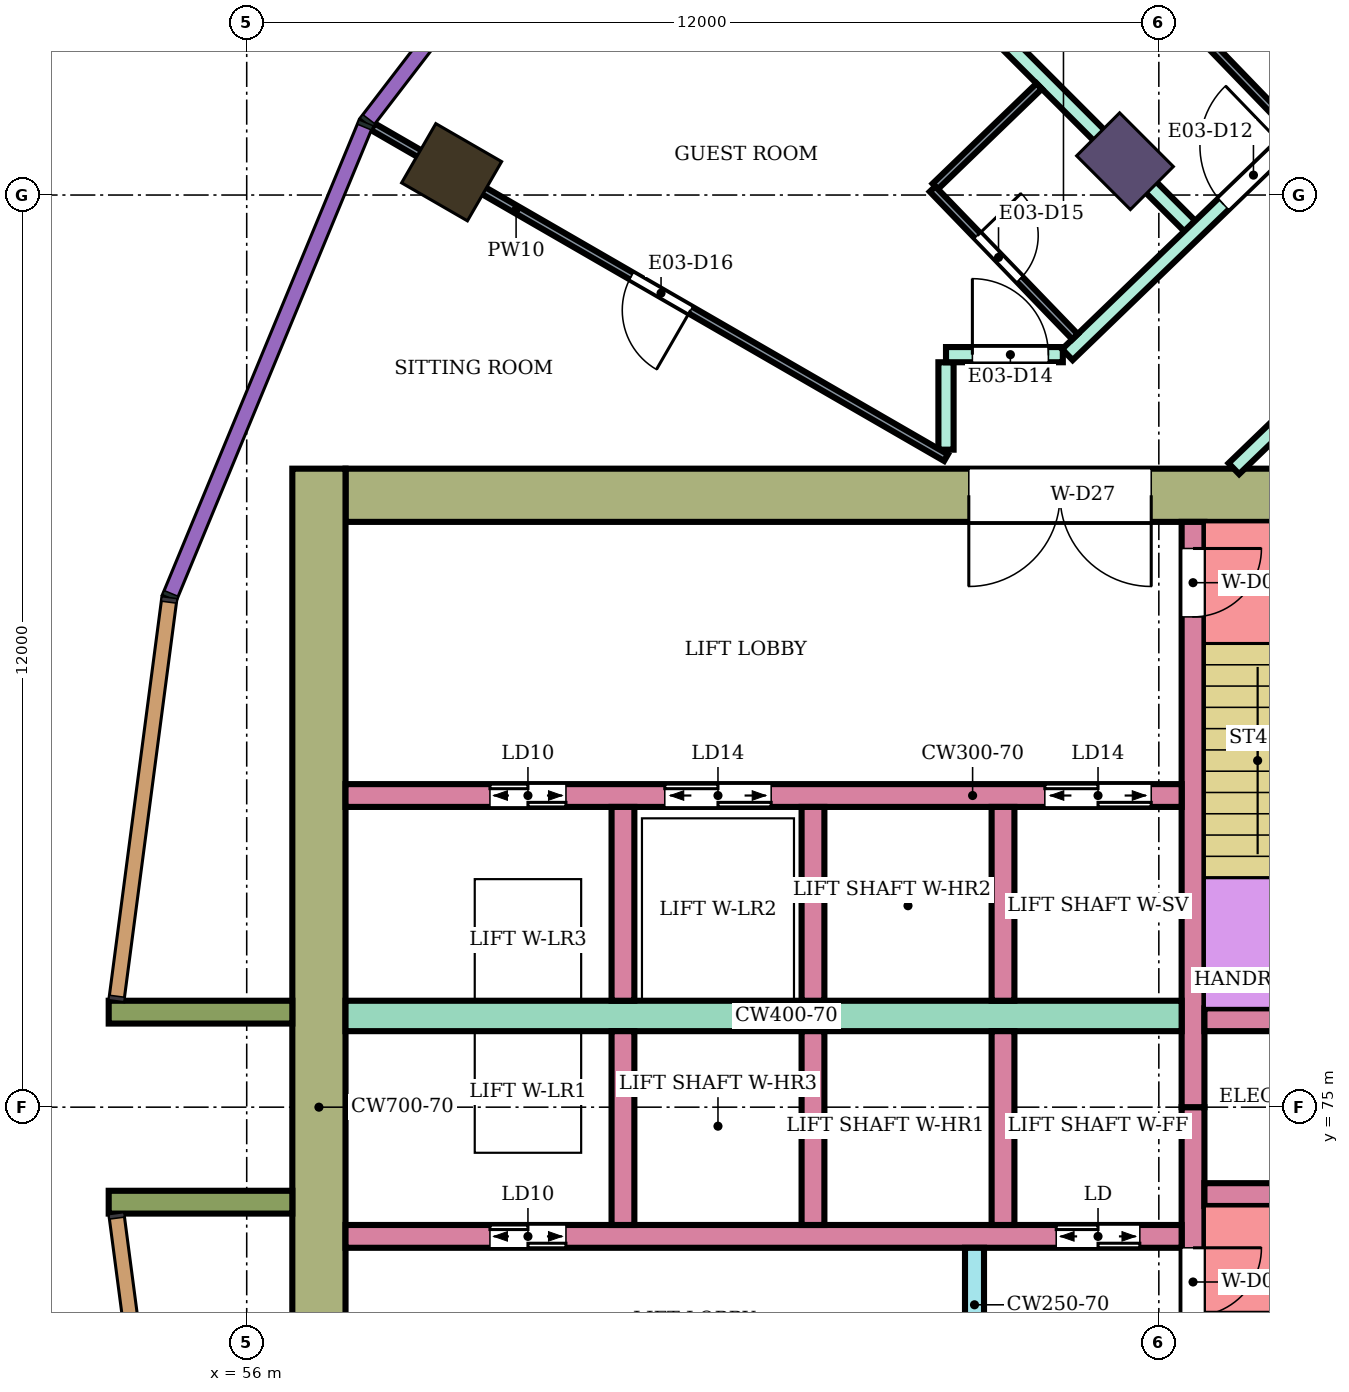
"""IFC4 building model, lengths in metres.
Left out: names, types, materials, properties, quantities, classifications, styles, units other than length and angle.
Written with IfcOpenShell. Run it as: python <this file> out.ifc"""

import sys

from ifc_helpers import new_model, si_unit, direction, frame, frame_2d, origin, origin_2d, place, context, subcontext, project, spatial, rectangle, extrude, element, fill, save


model = new_model("IFC4")
c1 = context("Model", 3, precision=1e-05, world=origin(), true_north=direction((0.0, 1.0)))
c2 = subcontext(c1, "Body", "Model", "MODEL_VIEW")
j1 = project(units=[si_unit("LENGTHUNIT", "METRE"), si_unit("PLANEANGLEUNIT", "RADIAN")], contexts=[c1])
p1 = place(None, origin())
s1 = spatial("IfcSite", under=j1, at=p1, CompositionType="ELEMENT")
p2 = place(p1, origin())
s2 = spatial("IfcBuilding", under=s1, at=p2, CompositionType="ELEMENT")
p3 = place(p2, frame((0.0, 0.0, 138.0)))
s3 = spatial("IfcBuildingStorey", under=s2, at=p3, CompositionType="ELEMENT", Elevation=138.0)
p4 = place(p3, frame((58.696, 87.3, 0.0), z_axis=(0.0, 0.0, 1.0), x_axis=(-0.866025403784, 0.5, 0.0)))
e1 = element("IfcColumn", 1, at=p4, inside=s3, PredefinedType="COLUMN", context=c2, shape_type="SweptSolid", body=[
    extrude(rectangle(XDim=1.0, YDim=0.9, at=origin_2d()), origin(), (0.0, 0.0, 1.0), 3.9),
])
p5 = place(p3, frame((67.555, 87.445, 0.0), z_axis=(0.0, 0.0, 1.0), x_axis=(-0.707106781187, 0.707106781187, 0.0)))
e2 = element("IfcColumn", 2, at=p5, inside=s3, PredefinedType="COLUMN", context=c2, shape_type="SweptSolid", body=[
    extrude(rectangle(XDim=1.0, YDim=0.8, at=origin_2d()), origin(), (0.0, 0.0, 1.0), 3.9),
])
p6 = place(p3, frame((72.1, 83.05, 0.0), z_axis=(0.0, 0.0, 1.0), x_axis=(-1.0, 0.0, 0.0)))
e3 = element("IfcWall", 3, at=p6, inside=s3, PredefinedType="SHEAR", context=c2, shape_type="SweptSolid", body=[
    extrude(rectangle(XDim=14.8, YDim=0.7, at=frame_2d((7.4, 0.0))), origin(), (0.0, 0.0, 1.0), 3.58),
])
p7 = place(p6, frame((4.2, 0.0, 0.0)))
e4 = element("IfcOpeningElement", 4, at=p7, cuts=e3, PredefinedType="OPENING", context=c2, shape_type="SweptSolid", body=[
    extrude(rectangle(XDim=2.4, YDim=2.4, at=frame_2d((1.2, 1.2))), frame((0.0, 0.36, 0.0), z_axis=(0.0, -1.0, 0.0), x_axis=(1.0, 0.0, 0.0)), (0.0, 0.0, 1.0), 0.72),
])
p8 = place(p3, frame((56.95, 83.4, 0.0), z_axis=(0.0, 0.0, 1.0), x_axis=(0.0, -1.0, 0.0)))
e5 = element("IfcWall", 5, at=p8, inside=s3, PredefinedType="SHEAR", context=c2, shape_type="SweptSolid", body=[
    extrude(rectangle(XDim=16.8, YDim=0.7, at=frame_2d((8.4, 0.0))), origin(), (0.0, 0.0, 1.0), 3.58),
])
p9 = place(p3, frame((68.45, 75.0, 0.0), z_axis=(0.0, 0.0, 1.0), x_axis=(0.0, -1.0, 0.0)))
e6 = element("IfcWall", 6, at=p9, inside=s3, PredefinedType="SHEAR", context=c2, shape_type="SweptSolid", body=[
    extrude(rectangle(XDim=7.7, YDim=0.3, at=frame_2d((3.85, 0.0))), origin(), (0.0, 0.0, 1.0), 3.58),
])
p10 = place(p9, frame((1.85, 0.0, 0.0)))
e7 = element("IfcOpeningElement", 7, at=p10, cuts=e6, PredefinedType="OPENING", context=c2, shape_type="SweptSolid", body=[
    extrude(rectangle(XDim=0.9, YDim=2.1, at=frame_2d((0.45, 1.05))), frame((0.0, 0.16, 0.0), z_axis=(0.0, -1.0, 0.0), x_axis=(1.0, 0.0, 0.0)), (0.0, 0.0, 1.0), 0.32),
])
p11 = place(p3, frame((68.45, 82.7, 0.0), z_axis=(0.0, 0.0, 1.0), x_axis=(0.0, -1.0, 0.0)))
e8 = element("IfcWall", 8, at=p11, inside=s3, PredefinedType="SHEAR", context=c2, shape_type="SweptSolid", body=[
    extrude(rectangle(XDim=7.7, YDim=0.3, at=frame_2d((3.85, 0.0))), origin(), (0.0, 0.0, 1.0), 3.58),
])
p12 = place(p11, frame((0.35, 0.0, 0.0)))
e9 = element("IfcOpeningElement", 9, at=p12, cuts=e8, PredefinedType="OPENING", context=c2, shape_type="SweptSolid", body=[
    extrude(rectangle(XDim=0.9, YDim=2.1, at=frame_2d((0.45, 1.05))), frame((0.0, 0.16, 0.0), z_axis=(0.0, -1.0, 0.0), x_axis=(1.0, 0.0, 0.0)), (0.0, 0.0, 1.0), 0.32),
])
p13 = place(p3, frame((71.65, 73.85, 0.0), z_axis=(0.0, 0.0, 1.0), x_axis=(-1.0, 0.0, 0.0)))
e10 = element("IfcWall", 10, at=p13, inside=s3, PredefinedType="SHEAR", context=c2, shape_type="SweptSolid", body=[
    extrude(rectangle(XDim=3.05, YDim=0.3, at=frame_2d((1.525, 0.0))), origin(), (0.0, 0.0, 1.0), 3.58),
])
p14 = place(p13, frame((1.1, 0.0, 0.0)))
e11 = element("IfcOpeningElement", 11, at=p14, cuts=e10, PredefinedType="OPENING", context=c2, shape_type="SweptSolid", body=[
    extrude(rectangle(XDim=0.7, YDim=2.0, at=frame_2d((0.35, 1.0))), frame((0.0, 0.16, 0.0), z_axis=(0.0, -1.0, 0.0), x_axis=(1.0, 0.0, 0.0)), (0.0, 0.0, 1.0), 0.32),
])
p15 = place(p3, frame((71.65, 76.15, 0.0), z_axis=(0.0, 0.0, 1.0), x_axis=(-1.0, 0.0, 0.0)))
e12 = element("IfcWall", 12, at=p15, inside=s3, PredefinedType="SHEAR", context=c2, shape_type="SweptSolid", body=[
    extrude(rectangle(XDim=3.05, YDim=0.3, at=frame_2d((1.525, 0.0))), origin(), (0.0, 0.0, 1.0), 3.58),
])
p16 = place(p3, frame((68.3, 73.3, 0.0), z_axis=(0.0, 0.0, 1.0), x_axis=(-1.0, 0.0, 0.0)))
e13 = element("IfcWall", 13, at=p16, inside=s3, PredefinedType="SHEAR", context=c2, shape_type="SweptSolid", body=[
    extrude(rectangle(XDim=11.0, YDim=0.3, at=frame_2d((5.5, 0.0))), origin(), (0.0, 0.0, 1.0), 3.58),
])
p17 = place(p16, frame((0.55, 0.0, 0.0)))
e14 = element("IfcOpeningElement", 14, at=p17, cuts=e13, PredefinedType="OPENING", context=c2, shape_type="SweptSolid", body=[
    extrude(rectangle(XDim=1.1, YDim=2.1, at=frame_2d((0.55, 1.05))), frame((0.0, 0.16, 0.0), z_axis=(0.0, -1.0, 0.0), x_axis=(1.0, 0.0, 0.0)), (0.0, 0.0, 1.0), 0.32),
])
p18 = place(p16, frame((8.1, 0.0, 0.0)))
e15 = element("IfcOpeningElement", 15, at=p18, cuts=e13, PredefinedType="OPENING", context=c2, shape_type="SweptSolid", body=[
    extrude(rectangle(XDim=1.0, YDim=2.1, at=frame_2d((0.5, 1.05))), frame((0.0, 0.16, 0.0), z_axis=(0.0, -1.0, 0.0), x_axis=(1.0, 0.0, 0.0)), (0.0, 0.0, 1.0), 0.32),
])
p19 = place(p3, frame((68.3, 76.2, 0.0), z_axis=(0.0, 0.0, 1.0), x_axis=(-1.0, 0.0, 0.0)))
e16 = element("IfcWall", 16, at=p19, inside=s3, PredefinedType="SHEAR", context=c2, shape_type="SweptSolid", body=[
    extrude(rectangle(XDim=11.0, YDim=0.4, at=frame_2d((5.5, 0.0))), origin(), (0.0, 0.0, 1.0), 3.58),
])
p20 = place(p3, frame((68.3, 79.1, 0.0), z_axis=(0.0, 0.0, 1.0), x_axis=(-1.0, 0.0, 0.0)))
e17 = element("IfcWall", 17, at=p20, inside=s3, PredefinedType="SHEAR", context=c2, shape_type="SweptSolid", body=[
    extrude(rectangle(XDim=11.0, YDim=0.3, at=frame_2d((5.5, 0.0))), origin(), (0.0, 0.0, 1.0), 3.58),
])
p21 = place(p20, frame((0.4, 0.0, 0.0)))
e18 = element("IfcOpeningElement", 18, at=p21, cuts=e17, PredefinedType="OPENING", context=c2, shape_type="SweptSolid", body=[
    extrude(rectangle(XDim=1.4, YDim=2.1, at=frame_2d((0.7, 1.05))), frame((0.0, 0.16, 0.0), z_axis=(0.0, -1.0, 0.0), x_axis=(1.0, 0.0, 0.0)), (0.0, 0.0, 1.0), 0.32),
])
p22 = place(p20, frame((5.4, 0.0, 0.0)))
e19 = element("IfcOpeningElement", 19, at=p22, cuts=e17, PredefinedType="OPENING", context=c2, shape_type="SweptSolid", body=[
    extrude(rectangle(XDim=1.4, YDim=2.1, at=frame_2d((0.7, 1.05))), frame((0.0, 0.16, 0.0), z_axis=(0.0, -1.0, 0.0), x_axis=(1.0, 0.0, 0.0)), (0.0, 0.0, 1.0), 0.32),
])
p23 = place(p20, frame((8.1, 0.0, 0.0)))
e20 = element("IfcOpeningElement", 20, at=p23, cuts=e17, PredefinedType="OPENING", context=c2, shape_type="SweptSolid", body=[
    extrude(rectangle(XDim=1.0, YDim=2.1, at=frame_2d((0.5, 1.05))), frame((0.0, 0.16, 0.0), z_axis=(0.0, -1.0, 0.0), x_axis=(1.0, 0.0, 0.0)), (0.0, 0.0, 1.0), 0.32),
])
for number, where, z_axis, x_axis in (
    (21, (65.95, 76.0, 0.0), (0.0, 0.0, 1.0), (0.0, -1.0, 0.0)),
    (22, (63.45, 76.0, 0.0), (0.0, 0.0, 1.0), (0.0, -1.0, 0.0)),
    (23, (60.95, 76.0, 0.0), (0.0, 0.0, 1.0), (0.0, -1.0, 0.0)),
    (24, (65.95, 78.95, 0.0), (0.0, 0.0, 1.0), (0.0, -1.0, 0.0)),
    (25, (63.45, 78.95, 0.0), (0.0, 0.0, 1.0), (0.0, -1.0, 0.0)),
    (26, (60.95, 78.95, 0.0), (0.0, 0.0, 1.0), (0.0, -1.0, 0.0)),
):
    element("IfcWall", number, at=place(p3, frame(where, z_axis=z_axis, x_axis=x_axis)), inside=s3, PredefinedType="SHEAR", context=c2, shape_type="SweptSolid", body=[
        extrude(rectangle(XDim=2.55, YDim=0.3, at=frame_2d((1.275, 0.0))), origin(), (0.0, 0.0, 1.0), 3.58),
    ])
p24 = place(p3, frame((65.575, 73.15, 0.0), z_axis=(0.0, 0.0, 1.0), x_axis=(0.0, -1.0, 0.0)))
e27 = element("IfcWall", 27, at=p24, inside=s3, PredefinedType="SHEAR", context=c2, shape_type="SweptSolid", body=[
    extrude(rectangle(XDim=1.5, YDim=0.25, at=frame_2d((0.75, 0.0))), origin(), (0.0, 0.0, 1.0), 3.58),
])
for number, where, z_axis, x_axis in (
    (28, (56.6, 76.25, 0.0), (0.0, 0.0, 1.0), (-1.0, 0.0, 0.0)),
    (29, (56.6, 73.75, 0.0), (0.0, 0.0, 1.0), (-1.0, 0.0, 0.0)),
):
    element("IfcWall", number, at=place(p3, frame(where, z_axis=z_axis, x_axis=x_axis)), inside=s3, PredefinedType="NOTDEFINED", context=c2, shape_type="SweptSolid", body=[
        extrude(rectangle(XDim=2.416, YDim=0.3, at=frame_2d((1.208, 0.0))), origin(), (0.0, 0.0, 1.0), 3.9),
    ])
p25 = place(p3, frame((63.596, 91.406, 0.0), z_axis=(0.0, 0.0, 1.0), x_axis=(0.706963264491, -0.707250268759, 0.0)))
e30 = element("IfcWall", 30, at=p25, inside=s3, PredefinedType="PARTITIONING", context=c2, shape_type="SweptSolid", body=[
    extrude(rectangle(XDim=6.805, YDim=0.2, at=frame_2d((3.403, 0.0))), origin(), (0.0, 0.0, 1.0), 3.45),
])
p26 = place(p3, frame((65.2, 83.65, 0.0), z_axis=(0.0, 0.0, 1.0), x_axis=(0.0, 1.0, 0.0)))
e31 = element("IfcWall", 31, at=p26, inside=s3, PredefinedType="PARTITIONING", context=c2, shape_type="SweptSolid", body=[
    extrude(rectangle(XDim=1.15, YDim=0.2, at=frame_2d((0.575, 0.0))), origin(), (0.0, 0.0, 1.0), 3.45),
])
p27 = place(p3, frame((65.2, 84.9, 0.0), z_axis=(0.0, 0.0, 1.0), x_axis=(1.0, 0.0, 0.0)))
e32 = element("IfcWall", 32, at=p27, inside=s3, PredefinedType="PARTITIONING", context=c2, shape_type="SweptSolid", body=[
    extrude(rectangle(XDim=1.537, YDim=0.2, at=frame_2d((0.769, 0.0))), origin(), (0.0, 0.0, 1.0), 3.45),
])
p28 = place(p27, frame((0.347, 0.0, 0.0)))
e33 = element("IfcOpeningElement", 33, at=p28, cuts=e32, PredefinedType="OPENING", context=c2, shape_type="SweptSolid", body=[
    extrude(rectangle(XDim=1.0, YDim=2.1, at=frame_2d((0.5, 1.05))), frame((0.0, 0.11, 0.0), z_axis=(0.0, -1.0, 0.0), x_axis=(1.0, 0.0, 0.0)), (0.0, 0.0, 1.0), 0.22),
])
p29 = place(p3, frame((66.797, 84.9, 0.0), z_axis=(0.0, 0.0, 1.0), x_axis=(0.719692092412, 0.694293376116, 0.0)))
e34 = element("IfcWall", 34, at=p29, inside=s3, PredefinedType="PARTITIONING", context=c2, shape_type="SweptSolid", body=[
    extrude(rectangle(XDim=6.584, YDim=0.2, at=frame_2d((3.292, 0.0))), origin(), (0.0, 0.0, 1.0), 3.45),
])
p30 = place(p29, frame((2.852, 0.0, 0.0)))
e35 = element("IfcOpeningElement", 35, at=p30, cuts=e34, PredefinedType="OPENING", context=c2, shape_type="SweptSolid", body=[
    extrude(rectangle(XDim=1.1, YDim=2.1, at=frame_2d((0.55, 1.05))), frame((0.0, 0.11, 0.0), z_axis=(0.0, -1.0, 0.0), x_axis=(1.0, 0.0, 0.0)), (0.0, 0.0, 1.0), 0.22),
])
p31 = place(p3, frame((68.987, 83.4, 0.0), z_axis=(0.0, 0.0, 1.0), x_axis=(0.719547721855, 0.694442996922, 0.0)))
e36 = element("IfcWall", 36, at=p31, inside=s3, PredefinedType="PARTITIONING", context=c2, shape_type="SweptSolid", body=[
    extrude(rectangle(XDim=5.378, YDim=0.2, at=frame_2d((2.689, 0.0))), origin(), (0.0, 0.0, 1.0), 3.45),
])
p32 = place(p31, frame((2.294, 0.0, 0.0)))
e37 = element("IfcOpeningElement", 37, at=p32, cuts=e36, PredefinedType="OPENING", context=c2, shape_type="SweptSolid", body=[
    extrude(rectangle(XDim=0.9, YDim=2.1, at=frame_2d((0.45, 1.05))), frame((0.0, 0.11, 0.0), z_axis=(0.0, -1.0, 0.0), x_axis=(1.0, 0.0, 0.0)), (0.0, 0.0, 1.0), 0.22),
])
p33 = place(p3, frame((57.659, 87.899, 0.0), z_axis=(0.0, 0.0, 1.0), x_axis=(0.86602264145, -0.500004784474, 0.0)))
e38 = element("IfcWall", 38, at=p33, inside=s3, PredefinedType="PARTITIONING", context=c2, shape_type="SweptSolid", body=[
    extrude(rectangle(XDim=8.708, YDim=0.1, at=frame_2d((4.354, 0.0))), origin(), (0.0, 0.0, 1.0), 3.45),
])
p34 = place(p33, frame((3.929, 0.0, 0.0)))
e39 = element("IfcOpeningElement", 39, at=p34, cuts=e38, PredefinedType="OPENING", context=c2, shape_type="SweptSolid", body=[
    extrude(rectangle(XDim=0.9, YDim=2.1, at=frame_2d((0.45, 1.05))), frame((0.0, 0.06, 0.0), z_axis=(0.0, -1.0, 0.0), x_axis=(1.0, 0.0, 0.0)), (0.0, 0.0, 1.0), 0.12),
])
p35 = place(p3, frame((65.059, 87.114, 0.0), z_axis=(0.0, 0.0, 1.0), x_axis=(0.719653890619, 0.694332973232, 0.0)))
e40 = element("IfcWall", 40, at=p35, inside=s3, PredefinedType="PARTITIONING", context=c2, shape_type="SweptSolid", body=[
    extrude(rectangle(XDim=1.899, YDim=0.1, at=frame_2d((0.95, 0.0))), origin(), (0.0, 0.0, 1.0), 3.45),
])
p36 = place(p3, frame((65.023, 87.079, 0.0), z_axis=(0.0, 0.0, 1.0), x_axis=(0.694287838235, -0.719697434815, 0.0)))
e41 = element("IfcWall", 41, at=p36, inside=s3, PredefinedType="PARTITIONING", context=c2, shape_type="SweptSolid", body=[
    extrude(rectangle(XDim=2.7, YDim=0.1, at=frame_2d((1.35, 0.0))), origin(), (0.0, 0.0, 1.0), 3.45),
])
p37 = place(p36, frame((0.85, 0.0, 0.0)))
e42 = element("IfcOpeningElement", 42, at=p37, cuts=e41, PredefinedType="OPENING", context=c2, shape_type="SweptSolid", body=[
    extrude(rectangle(XDim=0.8, YDim=2.1, at=frame_2d((0.4, 1.05))), frame((0.0, 0.06, 0.0), z_axis=(0.0, -1.0, 0.0), x_axis=(1.0, 0.0, 0.0)), (0.0, 0.0, 1.0), 0.12),
])
p38 = place(p3, frame((67.758, 89.926, 0.0), z_axis=(0.0, 0.0, 1.0), x_axis=(0.694485934895, -0.719506279495, 0.0)))
e43 = element("IfcWall", 43, at=p38, inside=s3, PredefinedType="PARTITIONING", context=c2, shape_type="SweptSolid", body=[
    extrude(rectangle(XDim=2.849, YDim=0.1, at=frame_2d((1.425, 0.0))), origin(), (0.0, 0.0, 1.0), 3.45),
])
p39 = place(p30, origin())
e44 = element("IfcDoor", 44, at=p39, inside=s3, OperationType="SINGLE_SWING_RIGHT", PredefinedType="DOOR", context=c2, shape_type="SweptSolid", body=[
    extrude(rectangle(XDim=1.1, YDim=2.1, at=frame_2d((0.55, 1.05))), frame((0.0, 0.025, 0.0), z_axis=(0.0, -1.0, 0.0), x_axis=(1.0, 0.0, 0.0)), (0.0, 0.0, 1.0), 0.05),
])
fill(e35, e44)
p40 = place(p28, origin())
e45 = element("IfcDoor", 45, at=p40, inside=s3, OperationType="SINGLE_SWING_LEFT", PredefinedType="DOOR", context=c2, shape_type="SweptSolid", body=[
    extrude(rectangle(XDim=1.0, YDim=2.1, at=frame_2d((0.5, 1.05))), frame((0.0, 0.025, 0.0), z_axis=(0.0, -1.0, 0.0), x_axis=(1.0, 0.0, 0.0)), (0.0, 0.0, 1.0), 0.05),
])
fill(e33, e45)
p41 = place(p37, origin())
e46 = element("IfcDoor", 46, at=p41, inside=s3, OperationType="SINGLE_SWING_LEFT", PredefinedType="DOOR", context=c2, shape_type="SweptSolid", body=[
    extrude(rectangle(XDim=0.8, YDim=2.1, at=frame_2d((0.4, 1.05))), frame((0.0, 0.025, 0.0), z_axis=(0.0, -1.0, 0.0), x_axis=(1.0, 0.0, 0.0)), (0.0, 0.0, 1.0), 0.05),
])
fill(e42, e46)
p42 = place(p34, frame((0.9, 0.0, 0.0), z_axis=(0.0, 0.0, 1.0), x_axis=(-1.0, 0.0, 0.0)))
e47 = element("IfcDoor", 47, at=p42, inside=s3, OperationType="SINGLE_SWING_LEFT", PredefinedType="DOOR", context=c2, shape_type="SweptSolid", body=[
    extrude(rectangle(XDim=0.9, YDim=2.1, at=frame_2d((0.45, 1.05))), frame((0.0, 0.025, 0.0), z_axis=(0.0, -1.0, 0.0), x_axis=(1.0, 0.0, 0.0)), (0.0, 0.0, 1.0), 0.05),
])
fill(e39, e47)
p43 = place(p10, origin())
e48 = element("IfcDoor", 48, at=p43, inside=s3, OperationType="SINGLE_SWING_LEFT", PredefinedType="DOOR", context=c2, shape_type="SweptSolid", body=[
    extrude(rectangle(XDim=0.9, YDim=2.1, at=frame_2d((0.45, 1.05))), frame((0.0, 0.025, 0.0), z_axis=(0.0, -1.0, 0.0), x_axis=(1.0, 0.0, 0.0)), (0.0, 0.0, 1.0), 0.05),
])
fill(e7, e48)
p44 = place(p12, origin())
e49 = element("IfcDoor", 49, at=p44, inside=s3, OperationType="SINGLE_SWING_LEFT", PredefinedType="DOOR", context=c2, shape_type="SweptSolid", body=[
    extrude(rectangle(XDim=0.9, YDim=2.1, at=frame_2d((0.45, 1.05))), frame((0.0, 0.025, 0.0), z_axis=(0.0, -1.0, 0.0), x_axis=(1.0, 0.0, 0.0)), (0.0, 0.0, 1.0), 0.05),
])
fill(e9, e49)
p45 = place(p17, origin())
e50 = element("IfcDoor", 50, at=p45, inside=s3, OperationType="DOUBLE_DOOR_SLIDING", PredefinedType="DOOR", context=c2, shape_type="SweptSolid", body=[
    extrude(rectangle(XDim=1.1, YDim=2.1, at=frame_2d((0.55, 1.05))), frame((0.0, 0.025, 0.0), z_axis=(0.0, -1.0, 0.0), x_axis=(1.0, 0.0, 0.0)), (0.0, 0.0, 1.0), 0.05),
])
fill(e14, e50)
p46 = place(p18, origin())
e51 = element("IfcDoor", 51, at=p46, inside=s3, OperationType="DOUBLE_DOOR_SLIDING", PredefinedType="DOOR", context=c2, shape_type="SweptSolid", body=[
    extrude(rectangle(XDim=1.0, YDim=2.1, at=frame_2d((0.5, 1.05))), frame((0.0, 0.025, 0.0), z_axis=(0.0, -1.0, 0.0), x_axis=(1.0, 0.0, 0.0)), (0.0, 0.0, 1.0), 0.05),
])
fill(e15, e51)
p47 = place(p21, origin())
e52 = element("IfcDoor", 52, at=p47, inside=s3, OperationType="DOUBLE_DOOR_SLIDING", PredefinedType="DOOR", context=c2, shape_type="SweptSolid", body=[
    extrude(rectangle(XDim=1.4, YDim=2.1, at=frame_2d((0.7, 1.05))), frame((0.0, 0.025, 0.0), z_axis=(0.0, -1.0, 0.0), x_axis=(1.0, 0.0, 0.0)), (0.0, 0.0, 1.0), 0.05),
])
fill(e18, e52)
p48 = place(p22, origin())
e53 = element("IfcDoor", 53, at=p48, inside=s3, OperationType="DOUBLE_DOOR_SLIDING", PredefinedType="DOOR", context=c2, shape_type="SweptSolid", body=[
    extrude(rectangle(XDim=1.4, YDim=2.1, at=frame_2d((0.7, 1.05))), frame((0.0, 0.025, 0.0), z_axis=(0.0, -1.0, 0.0), x_axis=(1.0, 0.0, 0.0)), (0.0, 0.0, 1.0), 0.05),
])
fill(e19, e53)
p49 = place(p23, origin())
e54 = element("IfcDoor", 54, at=p49, inside=s3, OperationType="DOUBLE_DOOR_SLIDING", PredefinedType="DOOR", context=c2, shape_type="SweptSolid", body=[
    extrude(rectangle(XDim=1.0, YDim=2.1, at=frame_2d((0.5, 1.05))), frame((0.0, 0.025, 0.0), z_axis=(0.0, -1.0, 0.0), x_axis=(1.0, 0.0, 0.0)), (0.0, 0.0, 1.0), 0.05),
])
fill(e20, e54)
p50 = place(p7, origin())
e55 = element("IfcDoor", 55, at=p50, inside=s3, OperationType="DOUBLE_DOOR_SINGLE_SWING", PredefinedType="DOOR", context=c2, shape_type="SweptSolid", body=[
    extrude(rectangle(XDim=2.4, YDim=2.4, at=frame_2d((1.2, 1.2))), frame((0.0, 0.025, 0.0), z_axis=(0.0, -1.0, 0.0), x_axis=(1.0, 0.0, 0.0)), (0.0, 0.0, 1.0), 0.05),
])
fill(e4, e55)
save(model, sys.argv[1])
